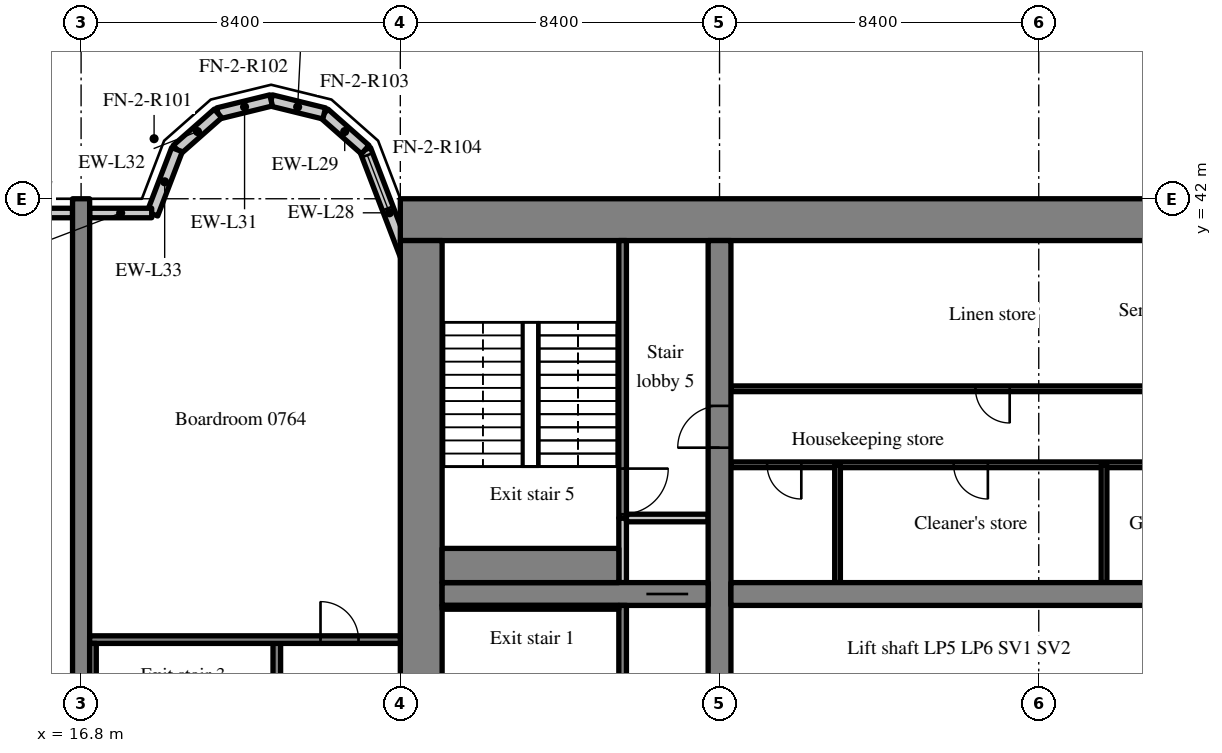
"""IFC4 building model, lengths in metres.
Left out: names, types, materials, properties, quantities, classifications, styles, units other than length and angle.
Written with IfcOpenShell. Run it as: python <this file> out.ifc"""

import sys

from ifc_helpers import new_model, si_unit, direction, frame, frame_2d, origin, place, context, subcontext, project, spatial, rectangle, extrude, source, transform, mapped, element, fill, save


model = new_model("IFC4")
c1 = context("Model", 3, precision=1e-05, world=origin(), true_north=direction((0.0, 1.0)))
c2 = subcontext(c1, "Body", "Model", "MODEL_VIEW")
j1 = project(units=[si_unit("LENGTHUNIT", "METRE"), si_unit("PLANEANGLEUNIT", "RADIAN")], contexts=[c1])
p1 = place(None, origin())
s1 = spatial("IfcSite", under=j1, at=p1, CompositionType="ELEMENT")
p2 = place(p1, origin())
s2 = spatial("IfcBuilding", under=s1, at=p2, CompositionType="ELEMENT")
p3 = place(p2, frame((0.0, 0.0, 35.4)))
s3 = spatial("IfcBuildingStorey", under=s2, at=p3, CompositionType="ELEMENT", Elevation=35.4)
m1 = source(origin(), c2, "Body", "SweptSolid", [
    extrude(rectangle(XDim=50.4, YDim=1.1, at=frame_2d((25.2, 0.0))), origin(), (0.0, 0.0, 1.0), 3.52),
])
p4 = place(p3, frame((25.2, 41.45, 0.0), z_axis=(0.0, 0.0, 1.0), x_axis=(1.0, 0.0, 0.0)))
e1 = element("IfcWall", 1, at=p4, inside=s3, PredefinedType="SHEAR", context=c2, shape_type="MappedRepresentation", body=[
    mapped(m1, transform((0.0, 0.0, 0.0), scale=1.0)),
])
m2 = source(origin(), c2, "Body", "SweptSolid", [
    extrude(rectangle(XDim=17.8, YDim=1.1, at=frame_2d((8.9, 0.0))), origin(), (0.0, 0.0, 1.0), 3.52),
])
p5 = place(p3, frame((25.75, 23.1, 0.0), z_axis=(0.0, 0.0, 1.0), x_axis=(0.0, 1.0, 0.0)))
e2 = element("IfcWall", 2, at=p5, inside=s3, PredefinedType="SHEAR", context=c2, shape_type="MappedRepresentation", body=[
    mapped(m2, transform((0.0, 0.0, 0.0), scale=1.0)),
])
m3 = source(origin(), c2, "Body", "SweptSolid", [
    extrude(rectangle(XDim=17.8, YDim=0.6, at=frame_2d((8.9, 0.0))), origin(), (0.0, 0.0, 1.0), 3.52),
])
p6 = place(p3, frame((33.6, 23.1, 0.0), z_axis=(0.0, 0.0, 1.0), x_axis=(0.0, 1.0, 0.0)))
e3 = element("IfcWall", 3, at=p6, inside=s3, PredefinedType="SHEAR", context=c2, shape_type="MappedRepresentation", body=[
    mapped(m3, transform((0.0, 0.0, 0.0), scale=1.0)),
])
m4 = source(origin(), c2, "Body", "SweptSolid", [
    extrude(rectangle(XDim=1.1, YDim=2.1, at=frame_2d((0.55, 1.05))), frame((0.0, 0.31, 0.0), z_axis=(0.0, -1.0, 0.0), x_axis=(1.0, 0.0, 0.0)), (0.0, 0.0, 1.0), 0.62),
])
p7 = place(p6, frame((12.35, 0.0, 0.0)))
e4 = element("IfcOpeningElement", 4, at=p7, cuts=e3, PredefinedType="OPENING", context=c2, shape_type="MappedRepresentation", body=[
    mapped(m4, transform((0.0, 0.0, 0.0), scale=1.0)),
])
m5 = source(origin(), c2, "Body", "SweptSolid", [
    extrude(rectangle(XDim=7.0, YDim=0.6, at=frame_2d((3.5, 0.0))), origin(), (0.0, 0.0, 1.0), 3.52),
])
p8 = place(p3, frame((26.3, 31.6, 0.0), z_axis=(0.0, 0.0, 1.0), x_axis=(1.0, 0.0, 0.0)))
e5 = element("IfcWall", 5, at=p8, inside=s3, PredefinedType="SHEAR", context=c2, shape_type="MappedRepresentation", body=[
    mapped(m5, transform((0.0, 0.0, 0.0), scale=1.0)),
])
p9 = place(p8, frame((5.375, 0.0, 0.0)))
e6 = element("IfcOpeningElement", 6, at=p9, cuts=e5, PredefinedType="OPENING", context=c2, shape_type="MappedRepresentation", body=[
    mapped(m4, transform((0.0, 0.0, 0.0), scale=1.0)),
])
m6 = source(origin(), c2, "Body", "SweptSolid", [
    extrude(rectangle(XDim=16.2, YDim=0.6, at=frame_2d((8.1, 0.0))), origin(), (0.0, 0.0, 1.0), 3.52),
])
p10 = place(p3, frame((33.9, 31.6, 0.0), z_axis=(0.0, 0.0, 1.0), x_axis=(1.0, 0.0, 0.0)))
e7 = element("IfcWall", 7, at=p10, inside=s3, PredefinedType="SHEAR", context=c2, shape_type="MappedRepresentation", body=[
    mapped(m6, transform((0.0, 0.0, 0.0), scale=1.0)),
])
m7 = source(origin(), c2, "Body", "SweptSolid", [
    extrude(rectangle(XDim=1.0, YDim=2.1, at=frame_2d((0.5, 1.05))), frame((0.0, 0.31, 0.0), z_axis=(0.0, -1.0, 0.0), x_axis=(1.0, 0.0, 0.0)), (0.0, 0.0, 1.0), 0.62),
])
p11 = place(p10, frame((14.65, 0.0, 0.0)))
e8 = element("IfcOpeningElement", 8, at=p11, cuts=e7, PredefinedType="OPENING", context=c2, shape_type="MappedRepresentation", body=[
    mapped(m7, transform((0.0, 0.0, 0.0), scale=1.0)),
])
m8 = source(origin(), c2, "Body", "SweptSolid", [
    extrude(rectangle(XDim=20.0, YDim=0.45, at=frame_2d((10.0, 0.0))), origin(), (0.0, 0.0, 1.0), 3.52),
])
p12 = place(p3, frame((16.8, 22.0, 0.0), z_axis=(0.0, 0.0, 1.0), x_axis=(0.0, 1.0, 0.0)))
e9 = element("IfcWall", 9, at=p12, inside=s3, PredefinedType="SHEAR", context=c2, shape_type="MappedRepresentation", body=[
    mapped(m8, transform((0.0, 0.0, 0.0), scale=1.0)),
])
m9 = source(origin(), c2, "Body", "SweptSolid", [
    extrude(rectangle(XDim=3.559, YDim=0.3, at=frame_2d((1.78, 0.0))), origin(), (0.0, 0.0, 1.0), 3.52),
])
p13 = place(p3, frame((25.55, 39.969, 0.0), z_axis=(0.0, 0.0, 1.0), x_axis=(-0.35779745313, 0.933799219604, 0.0)))
e10 = element("IfcWall", 10, at=p13, inside=s3, PredefinedType="SOLIDWALL", context=c2, shape_type="MappedRepresentation", body=[
    mapped(m9, transform((0.0, 0.0, 0.0), scale=1.0)),
])
m10 = source(origin(), c2, "Body", "SweptSolid", [
    extrude(rectangle(XDim=1.5, YDim=2.0, at=frame_2d((0.75, 1.0))), frame((0.0, 0.16, 0.0), z_axis=(0.0, -1.0, 0.0), x_axis=(1.0, 0.0, 0.0)), (0.0, 0.0, 1.0), 0.32),
])
p14 = place(p13, frame((1.903, 0.0, 0.9)))
e11 = element("IfcOpeningElement", 11, at=p14, cuts=e10, PredefinedType="OPENING", context=c2, shape_type="MappedRepresentation", body=[
    mapped(m10, transform((0.0, 0.0, 0.0), scale=1.0)),
])
m11 = source(origin(), c2, "Body", "SweptSolid", [
    extrude(rectangle(XDim=1.44, YDim=0.3, at=frame_2d((0.72, 0.0))), origin(), (0.0, 0.0, 1.0), 3.52),
])
p15 = place(p3, frame((24.277, 43.292, 0.0), z_axis=(0.0, 0.0, 1.0), x_axis=(-0.749649827867, 0.661834673902, 0.0)))
e12 = element("IfcWall", 12, at=p15, inside=s3, PredefinedType="SOLIDWALL", context=c2, shape_type="MappedRepresentation", body=[
    mapped(m11, transform((0.0, 0.0, 0.0), scale=1.0)),
])
m12 = source(origin(), c2, "Body", "SweptSolid", [
    extrude(rectangle(XDim=1.438, YDim=0.3, at=frame_2d((0.719, 0.0))), origin(), (0.0, 0.0, 1.0), 3.52),
])
p16 = place(p3, frame((23.197, 44.245, 0.0), z_axis=(0.0, 0.0, 1.0), x_axis=(-0.971152283879, 0.238460146601, 0.0)))
e13 = element("IfcWall", 13, at=p16, inside=s3, PredefinedType="SOLIDWALL", context=c2, shape_type="MappedRepresentation", body=[
    mapped(m12, transform((0.0, 0.0, 0.0), scale=1.0)),
])
m13 = source(origin(), c2, "Body", "SweptSolid", [
    extrude(rectangle(XDim=1.439, YDim=0.3, at=frame_2d((0.719, 0.0))), origin(), (0.0, 0.0, 1.0), 3.52),
])
p17 = place(p3, frame((21.8, 44.588, 0.0), z_axis=(0.0, 0.0, 1.0), x_axis=(-0.971161932466, -0.238420848351, 0.0)))
e14 = element("IfcWall", 14, at=p17, inside=s3, PredefinedType="SOLIDWALL", context=c2, shape_type="MappedRepresentation", body=[
    mapped(m13, transform((0.0, 0.0, 0.0), scale=1.0)),
])
m14 = source(origin(), c2, "Body", "SweptSolid", [
    extrude(rectangle(XDim=1.44, YDim=0.3, at=frame_2d((0.72, 0.0))), origin(), (0.0, 0.0, 1.0), 3.52),
])
p18 = place(p3, frame((20.403, 44.245, 0.0), z_axis=(0.0, 0.0, 1.0), x_axis=(-0.74957555648, -0.661918790432, 0.0)))
e15 = element("IfcWall", 15, at=p18, inside=s3, PredefinedType="SOLIDWALL", context=c2, shape_type="MappedRepresentation", body=[
    mapped(m14, transform((0.0, 0.0, 0.0), scale=1.0)),
])
m15 = source(origin(), c2, "Body", "SweptSolid", [
    extrude(rectangle(XDim=1.812, YDim=0.3, at=frame_2d((0.906, 0.0))), origin(), (0.0, 0.0, 1.0), 3.52),
])
p19 = place(p3, frame((19.323, 43.292, 0.0), z_axis=(0.0, 0.0, 1.0), x_axis=(-0.357877270961, -0.93376863244, 0.0)))
e16 = element("IfcWall", 16, at=p19, inside=s3, PredefinedType="SOLIDWALL", context=c2, shape_type="MappedRepresentation", body=[
    mapped(m15, transform((0.0, 0.0, 0.0), scale=1.0)),
])
m16 = source(origin(), c2, "Body", "SweptSolid", [
    extrude(rectangle(XDim=3.525, YDim=0.25, at=frame_2d((1.762, 0.0))), origin(), (0.0, 0.0, 1.0), 2.77),
])
p20 = place(p3, frame((16.575, 41.625, 0.0), z_axis=(0.0, 0.0, 1.0), x_axis=(-1.0, 0.0, 0.0)))
e17 = element("IfcWall", 17, at=p20, inside=s3, PredefinedType="SOLIDWALL", context=c2, shape_type="MappedRepresentation", body=[
    mapped(m16, transform((0.0, 0.0, 0.0), scale=1.0)),
])
m17 = source(origin(), c2, "Body", "SweptSolid", [
    extrude(rectangle(XDim=1.5, YDim=1.5, at=frame_2d((0.75, 0.75))), frame((0.0, 0.135, 0.0), z_axis=(0.0, -1.0, 0.0), x_axis=(1.0, 0.0, 0.0)), (0.0, 0.0, 1.0), 0.27),
])
p21 = place(p20, frame((1.012, 0.0, 0.9)))
e18 = element("IfcOpeningElement", 18, at=p21, cuts=e17, PredefinedType="OPENING", context=c2, shape_type="MappedRepresentation", body=[
    mapped(m17, transform((0.0, 0.0, 0.0), scale=1.0)),
])
m18 = source(origin(), c2, "Body", "SweptSolid", [
    extrude(rectangle(XDim=1.633, YDim=0.25, at=frame_2d((0.816, 0.0))), origin(), (0.0, 0.0, 1.0), 2.77),
])
p22 = place(p3, frame((18.658, 41.625, 0.0), z_axis=(0.0, 0.0, 1.0), x_axis=(-1.0, 0.0, 0.0)))
e19 = element("IfcWall", 19, at=p22, inside=s3, PredefinedType="SOLIDWALL", context=c2, shape_type="MappedRepresentation", body=[
    mapped(m18, transform((0.0, 0.0, 0.0), scale=1.0)),
])
m19 = source(origin(), c2, "Body", "SweptSolid", [
    extrude(rectangle(XDim=14.1, YDim=0.15, at=frame_2d((7.05, 0.0))), origin(), (0.0, 0.0, 1.0), 3.52),
])
p23 = place(p3, frame((33.9, 35.0, 0.0), z_axis=(0.0, 0.0, 1.0), x_axis=(1.0, 0.0, 0.0)))
e20 = element("IfcWall", 20, at=p23, inside=s3, PredefinedType="PARTITIONING", context=c2, shape_type="MappedRepresentation", body=[
    mapped(m19, transform((0.0, 0.0, 0.0), scale=1.0)),
])
m20 = source(origin(), c2, "Body", "SweptSolid", [
    extrude(rectangle(XDim=0.9, YDim=2.1, at=frame_2d((0.45, 1.05))), frame((0.0, 0.085, 0.0), z_axis=(0.0, -1.0, 0.0), x_axis=(1.0, 0.0, 0.0)), (0.0, 0.0, 1.0), 0.17),
])
p24 = place(p23, frame((0.952, 0.0, 0.0)))
e21 = element("IfcOpeningElement", 21, at=p24, cuts=e20, PredefinedType="OPENING", context=c2, shape_type="MappedRepresentation", body=[
    mapped(m20, transform((0.0, 0.0, 0.0), scale=1.0)),
])
p25 = place(p23, frame((5.861, 0.0, 0.0)))
e22 = element("IfcOpeningElement", 22, at=p25, cuts=e20, PredefinedType="OPENING", context=c2, shape_type="MappedRepresentation", body=[
    mapped(m20, transform((0.0, 0.0, 0.0), scale=1.0)),
])
p26 = place(p23, frame((11.471, 0.0, 0.0)))
e23 = element("IfcOpeningElement", 23, at=p26, cuts=e20, PredefinedType="OPENING", context=c2, shape_type="MappedRepresentation", body=[
    mapped(m20, transform((0.0, 0.0, 0.0), scale=1.0)),
])
m21 = source(origin(), c2, "Body", "SweptSolid", [
    extrude(rectangle(XDim=16.2, YDim=0.15, at=frame_2d((8.1, 0.0))), origin(), (0.0, 0.0, 1.0), 3.52),
])
p27 = place(p3, frame((33.9, 37.0, 0.0), z_axis=(0.0, 0.0, 1.0), x_axis=(1.0, 0.0, 0.0)))
e24 = element("IfcWall", 24, at=p27, inside=s3, PredefinedType="PARTITIONING", context=c2, shape_type="MappedRepresentation", body=[
    mapped(m21, transform((0.0, 0.0, 0.0), scale=1.0)),
])
p28 = place(p27, frame((6.435, 0.0, 0.0)))
e25 = element("IfcOpeningElement", 25, at=p28, cuts=e24, PredefinedType="OPENING", context=c2, shape_type="MappedRepresentation", body=[
    mapped(m20, transform((0.0, 0.0, 0.0), scale=1.0)),
])
p29 = place(p27, frame((14.535, 0.0, 0.0)))
e26 = element("IfcOpeningElement", 26, at=p29, cuts=e24, PredefinedType="OPENING", context=c2, shape_type="MappedRepresentation", body=[
    mapped(m20, transform((0.0, 0.0, 0.0), scale=1.0)),
])
m22 = source(origin(), c2, "Body", "SweptSolid", [
    extrude(rectangle(XDim=3.1, YDim=0.15, at=frame_2d((1.55, 0.0))), origin(), (0.0, 0.0, 1.0), 3.52),
])
for number, where, z_axis, x_axis in (
    (27, (36.705, 31.9, 0.0), (0.0, 0.0, 1.0), (0.0, 1.0, 0.0)),
    (28, (43.718, 31.9, 0.0), (0.0, 0.0, 1.0), (0.0, 1.0, 0.0)),
):
    element("IfcWall", number, at=place(p3, frame(where, z_axis=z_axis, x_axis=x_axis)), inside=s3, PredefinedType="PARTITIONING", context=c2, shape_type="MappedRepresentation", body=[
        mapped(m22, transform((0.0, 0.0, 0.0), scale=1.0)),
    ])
m23 = source(origin(), c2, "Body", "SweptSolid", [
    extrude(rectangle(XDim=8.2, YDim=0.2, at=frame_2d((4.1, 0.0))), origin(), (0.0, 0.0, 1.0), 3.52),
])
p30 = place(p3, frame((31.05, 23.1, 0.0), z_axis=(0.0, 0.0, 1.0), x_axis=(0.0, 1.0, 0.0)))
e29 = element("IfcWall", 29, at=p30, inside=s3, PredefinedType="SOLIDWALL", context=c2, shape_type="MappedRepresentation", body=[
    mapped(m23, transform((0.0, 0.0, 0.0), scale=1.0)),
])
m24 = source(origin(), c2, "Body", "SweptSolid", [
    extrude(rectangle(XDim=1.2, YDim=2.1, at=frame_2d((0.6, 1.05))), frame((0.0, 0.11, 0.0), z_axis=(0.0, -1.0, 0.0), x_axis=(1.0, 0.0, 0.0)), (0.0, 0.0, 1.0), 0.22),
])
p31 = place(p30, frame((0.5, 0.0, 0.0)))
e30 = element("IfcOpeningElement", 30, at=p31, cuts=e29, PredefinedType="OPENING", context=c2, shape_type="MappedRepresentation", body=[
    mapped(m24, transform((0.0, 0.0, 0.0), scale=1.0)),
])
m25 = source(origin(), c2, "Body", "SweptSolid", [
    extrude(rectangle(XDim=1.7, YDim=0.2, at=frame_2d((0.85, 0.0))), origin(), (0.0, 0.0, 1.0), 3.52),
])
p32 = place(p3, frame((31.05, 31.9, 0.0), z_axis=(0.0, 0.0, 1.0), x_axis=(0.0, 1.0, 0.0)))
e31 = element("IfcWall", 31, at=p32, inside=s3, PredefinedType="SOLIDWALL", context=c2, shape_type="MappedRepresentation", body=[
    mapped(m25, transform((0.0, 0.0, 0.0), scale=1.0)),
])
m26 = source(origin(), c2, "Body", "SweptSolid", [
    extrude(rectangle(XDim=2.15, YDim=0.2, at=frame_2d((1.075, 0.0))), origin(), (0.0, 0.0, 1.0), 3.52),
])
p33 = place(p3, frame((31.15, 33.6, 0.0), z_axis=(0.0, 0.0, 1.0), x_axis=(1.0, 0.0, 0.0)))
e32 = element("IfcWall", 32, at=p33, inside=s3, PredefinedType="SOLIDWALL", context=c2, shape_type="MappedRepresentation", body=[
    mapped(m26, transform((0.0, 0.0, 0.0), scale=1.0)),
])
m27 = source(origin(), c2, "Body", "SweptSolid", [
    extrude(rectangle(XDim=7.3, YDim=0.2, at=frame_2d((3.65, 0.0))), origin(), (0.0, 0.0, 1.0), 3.52),
])
p34 = place(p3, frame((31.05, 33.6, 0.0), z_axis=(0.0, 0.0, 1.0), x_axis=(0.0, 1.0, 0.0)))
e33 = element("IfcWall", 33, at=p34, inside=s3, PredefinedType="SOLIDWALL", context=c2, shape_type="MappedRepresentation", body=[
    mapped(m27, transform((0.0, 0.0, 0.0), scale=1.0)),
])
p35 = place(p34, frame((0.1, 0.0, 0.0)))
e34 = element("IfcOpeningElement", 34, at=p35, cuts=e33, PredefinedType="OPENING", context=c2, shape_type="MappedRepresentation", body=[
    mapped(m24, transform((0.0, 0.0, 0.0), scale=1.0)),
])
m28 = source(origin(), c2, "Body", "SweptSolid", [
    extrude(rectangle(XDim=8.3, YDim=0.2, at=frame_2d((4.15, 0.0))), origin(), (0.0, 0.0, 1.0), 3.52),
])
p36 = place(p3, frame((21.95, 22.1, 0.0), z_axis=(0.0, 0.0, 1.0), x_axis=(0.0, 1.0, 0.0)))
e35 = element("IfcWall", 35, at=p36, inside=s3, PredefinedType="SOLIDWALL", context=c2, shape_type="MappedRepresentation", body=[
    mapped(m28, transform((0.0, 0.0, 0.0), scale=1.0)),
])
p37 = place(p36, frame((0.6, 0.0, 0.0)))
e36 = element("IfcOpeningElement", 36, at=p37, cuts=e35, PredefinedType="OPENING", context=c2, shape_type="MappedRepresentation", body=[
    mapped(m24, transform((0.0, 0.0, 0.0), scale=1.0)),
])
m29 = source(origin(), c2, "Body", "SweptSolid", [
    extrude(rectangle(XDim=8.175, YDim=0.2, at=frame_2d((4.087, 0.0))), origin(), (0.0, 0.0, 1.0), 3.52),
])
p38 = place(p3, frame((17.025, 30.4, 0.0), z_axis=(0.0, 0.0, 1.0), x_axis=(1.0, 0.0, 0.0)))
e37 = element("IfcWall", 37, at=p38, inside=s3, PredefinedType="SOLIDWALL", context=c2, shape_type="MappedRepresentation", body=[
    mapped(m29, transform((0.0, 0.0, 0.0), scale=1.0)),
])
m30 = source(origin(), c2, "Body", "SweptSolid", [
    extrude(rectangle(XDim=1.0, YDim=2.1, at=frame_2d((0.5, 1.05))), frame((0.0, 0.11, 0.0), z_axis=(0.0, -1.0, 0.0), x_axis=(1.0, 0.0, 0.0)), (0.0, 0.0, 1.0), 0.22),
])
p39 = place(p38, frame((6.075, 0.0, 0.0)))
e38 = element("IfcOpeningElement", 38, at=p39, cuts=e37, PredefinedType="OPENING", context=c2, shape_type="MappedRepresentation", body=[
    mapped(m30, transform((0.0, 0.0, 0.0), scale=1.0)),
])
m31 = source(origin(), c2, "Body", "SweptSolid", [
    extrude(rectangle(XDim=4.65, YDim=0.1, at=frame_2d((2.325, 0.0))), origin(), (0.0, 0.0, 1.0), 3.52),
])
p40 = place(p3, frame((26.3, 31.25, 0.0), z_axis=(0.0, 0.0, 1.0), x_axis=(1.0, 0.0, 0.0)))
e39 = element("IfcWall", 39, at=p40, inside=s3, PredefinedType="SOLIDWALL", context=c2, shape_type="MappedRepresentation", body=[
    mapped(m31, transform((0.0, 0.0, 0.0), scale=1.0)),
])
m32 = source(origin(), c2, "Body", "SweptSolid", [
    extrude(rectangle(XDim=8.1, YDim=0.175, at=frame_2d((4.05, 0.0))), origin(), (0.0, 0.0, 1.0), 3.52),
])
p41 = place(p3, frame((17.112, 22.2, 0.0), z_axis=(0.0, 0.0, 1.0), x_axis=(0.0, 1.0, 0.0)))
e40 = element("IfcWall", 40, at=p41, inside=s3, PredefinedType="SOLIDWALL", context=c2, shape_type="MappedRepresentation", body=[
    mapped(m32, transform((0.0, 0.0, 0.0), scale=1.0)),
])
m33 = source(origin(), c2, "Body", "SweptSolid", [
    extrude(rectangle(XDim=4.65, YDim=0.9, at=frame_2d((2.325, 0.0))), origin(), (0.0, 0.0, 1.0), 3.52),
])
p42 = place(p3, frame((26.3, 32.35, 0.0), z_axis=(0.0, 0.0, 1.0), x_axis=(1.0, 0.0, 0.0)))
e41 = element("IfcWall", 41, at=p42, inside=s3, PredefinedType="SOLIDWALL", context=c2, shape_type="MappedRepresentation", body=[
    mapped(m33, transform((0.0, 0.0, 0.0), scale=1.0)),
])
m34 = source(origin(), c2, "Body", "SweptSolid", [
    extrude(rectangle(XDim=1.5, YDim=2.0, at=frame_2d((0.75, 1.0))), frame((0.0, 0.03, 0.0), z_axis=(0.0, -1.0, 0.0), x_axis=(1.0, 0.0, 0.0)), (0.0, 0.0, 1.0), 0.06),
])
p43 = place(p14, origin())
e42 = element("IfcWindow", 42, at=p43, inside=s3, PartitioningType="SINGLE_PANEL", PredefinedType="WINDOW", context=c2, shape_type="MappedRepresentation", body=[
    mapped(m34, transform((0.0, 0.0, 0.0), scale=1.0)),
])
fill(e11, e42)
m35 = source(origin(), c2, "Body", "SweptSolid", [
    extrude(rectangle(XDim=0.9, YDim=2.1, at=frame_2d((0.45, 1.05))), frame((0.0, 0.025, 0.0), z_axis=(0.0, -1.0, 0.0), x_axis=(1.0, 0.0, 0.0)), (0.0, 0.0, 1.0), 0.05),
])
p44 = place(p24, origin())
e43 = element("IfcDoor", 43, at=p44, inside=s3, OperationType="SINGLE_SWING_RIGHT", PredefinedType="DOOR", context=c2, shape_type="MappedRepresentation", body=[
    mapped(m35, transform((0.0, 0.0, 0.0), scale=1.0)),
])
fill(e21, e43)
p45 = place(p25, origin())
e44 = element("IfcDoor", 44, at=p45, inside=s3, OperationType="SINGLE_SWING_RIGHT", PredefinedType="DOOR", context=c2, shape_type="MappedRepresentation", body=[
    mapped(m35, transform((0.0, 0.0, 0.0), scale=1.0)),
])
fill(e22, e44)
p46 = place(p28, origin())
e45 = element("IfcDoor", 45, at=p46, inside=s3, OperationType="SINGLE_SWING_RIGHT", PredefinedType="DOOR", context=c2, shape_type="MappedRepresentation", body=[
    mapped(m35, transform((0.0, 0.0, 0.0), scale=1.0)),
])
fill(e25, e45)
m36 = source(origin(), c2, "Body", "SweptSolid", [
    extrude(rectangle(XDim=1.1, YDim=2.1, at=frame_2d((0.55, 1.05))), frame((0.0, 0.025, 0.0), z_axis=(0.0, -1.0, 0.0), x_axis=(1.0, 0.0, 0.0)), (0.0, 0.0, 1.0), 0.05),
])
p47 = place(p9, origin())
e46 = element("IfcDoor", 46, at=p47, inside=s3, OperationType="SLIDING_TO_RIGHT", PredefinedType="DOOR", context=c2, shape_type="MappedRepresentation", body=[
    mapped(m36, transform((0.0, 0.0, 0.0), scale=1.0)),
])
fill(e6, e46)
m37 = source(origin(), c2, "Body", "SweptSolid", [
    extrude(rectangle(XDim=1.2, YDim=2.1, at=frame_2d((0.6, 1.05))), frame((0.0, 0.025, 0.0), z_axis=(0.0, -1.0, 0.0), x_axis=(1.0, 0.0, 0.0)), (0.0, 0.0, 1.0), 0.05),
])
p48 = place(p35, origin())
e47 = element("IfcDoor", 47, at=p48, inside=s3, OperationType="SINGLE_SWING_RIGHT", PredefinedType="DOOR", context=c2, shape_type="MappedRepresentation", body=[
    mapped(m37, transform((0.0, 0.0, 0.0), scale=1.0)),
])
fill(e34, e47)
m38 = source(origin(), c2, "Body", "SweptSolid", [
    extrude(rectangle(XDim=1.0, YDim=2.1, at=frame_2d((0.5, 1.05))), frame((0.0, 0.025, 0.0), z_axis=(0.0, -1.0, 0.0), x_axis=(1.0, 0.0, 0.0)), (0.0, 0.0, 1.0), 0.05),
])
p49 = place(p39, origin())
e48 = element("IfcDoor", 48, at=p49, inside=s3, OperationType="SINGLE_SWING_LEFT", PredefinedType="DOOR", context=c2, shape_type="MappedRepresentation", body=[
    mapped(m38, transform((0.0, 0.0, 0.0), scale=1.0)),
])
fill(e38, e48)
p50 = place(p7, origin())
e49 = element("IfcDoor", 49, at=p50, inside=s3, OperationType="SINGLE_SWING_LEFT", PredefinedType="DOOR", context=c2, shape_type="MappedRepresentation", body=[
    mapped(m36, transform((0.0, 0.0, 0.0), scale=1.0)),
])
fill(e4, e49)
save(model, sys.argv[1])
